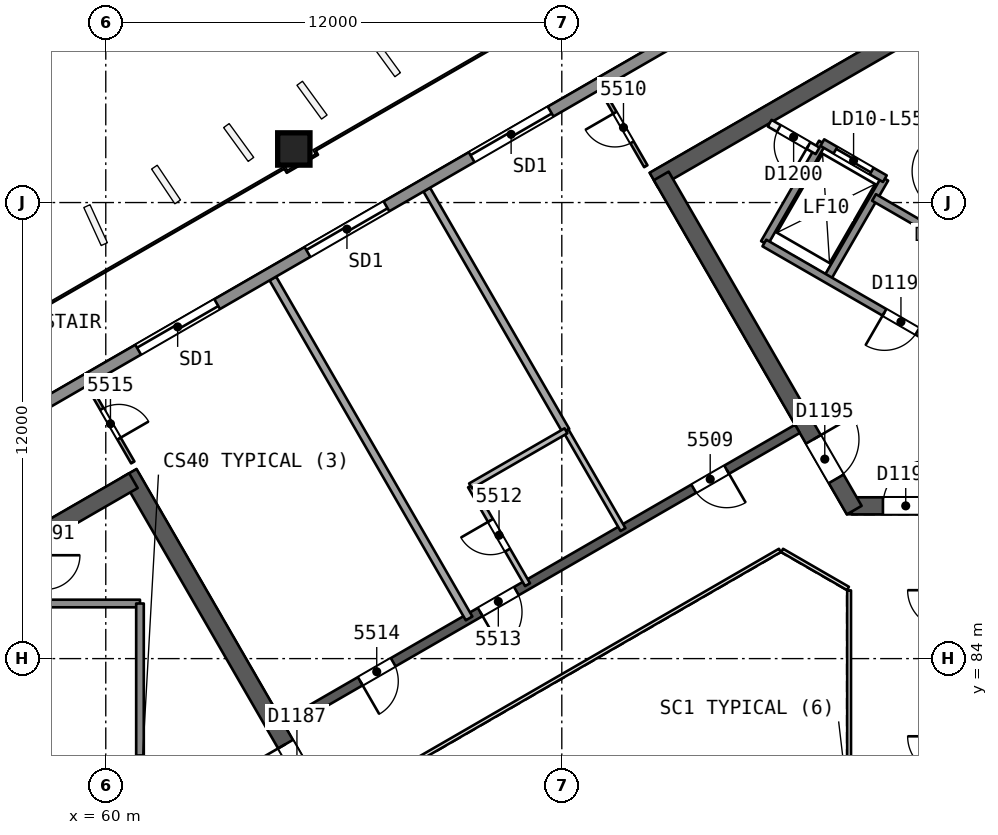
"""IFC4 building model, lengths in metres.
Left out: names, types, materials, properties, quantities, classifications, styles, units other than length and angle.
Written with IfcOpenShell. Run it as: python <this file> out.ifc"""

import sys

from ifc_helpers import new_model, si_unit, direction, frame, frame_2d, origin, origin_2d, place, context, subcontext, project, spatial, rectangle, extrude, element, fill, save


model = new_model("IFC4")
c1 = context("Model", 3, precision=1e-05, world=origin(), true_north=direction((0.0, 1.0)))
c2 = subcontext(c1, "Body", "Model", "MODEL_VIEW")
j1 = project(units=[si_unit("LENGTHUNIT", "METRE"), si_unit("PLANEANGLEUNIT", "RADIAN")], contexts=[c1])
p1 = place(None, origin())
s1 = spatial("IfcSite", under=j1, at=p1, CompositionType="ELEMENT")
p2 = place(p1, origin())
s2 = spatial("IfcBuilding", under=s1, at=p2, CompositionType="ELEMENT")
p3 = place(p2, frame((0.0, 0.0, 224.3)))
s3 = spatial("IfcBuildingStorey", under=s2, at=p3, CompositionType="ELEMENT", Elevation=224.3)
p4 = place(p3, frame((65.74, 80.0, 0.0), z_axis=(0.0, 0.0, 1.0), x_axis=(-0.499991857942, 0.866030104553, 0.0)))
e1 = element("IfcWall", 1, at=p4, inside=s3, PredefinedType="SHEAR", context=c2, shape_type="SweptSolid", body=[
    extrude(rectangle(XDim=10.25, YDim=0.45, at=frame_2d((5.125, 0.0))), origin(), (0.0, 0.0, 1.0), 3.7),
])
p5 = place(p4, frame((0.82, 0.0, 0.0)))
e2 = element("IfcOpeningElement", 2, at=p5, cuts=e1, PredefinedType="OPENING", context=c2, shape_type="SweptSolid", body=[
    extrude(rectangle(XDim=1.2, YDim=2.1, at=frame_2d((0.6, 1.05))), frame((0.0, 0.235, 0.0), z_axis=(0.0, -1.0, 0.0), x_axis=(1.0, 0.0, 0.0)), (0.0, 0.0, 1.0), 0.471),
])
p6 = place(p3, frame((60.728, 88.682, 0.0), z_axis=(0.0, 0.0, 1.0), x_axis=(-0.866021613849, -0.500006564303, 0.0)))
e3 = element("IfcWall", 3, at=p6, inside=s3, PredefinedType="SHEAR", context=c2, shape_type="SweptSolid", body=[
    extrude(rectangle(XDim=14.108, YDim=0.45, at=frame_2d((7.054, 0.0))), origin(), (0.0, 0.0, 1.0), 3.7),
])
p7 = place(p3, frame((79.63, 88.019, 0.0), z_axis=(0.0, 0.0, 1.0), x_axis=(1.0, 0.0, 0.0)))
e4 = element("IfcWall", 4, at=p7, inside=s3, PredefinedType="SHEAR", context=c2, shape_type="SweptSolid", body=[
    extrude(rectangle(XDim=10.25, YDim=0.45, at=frame_2d((5.125, 0.0))), origin(), (0.0, 0.0, 1.0), 3.7),
])
p8 = place(p7, frame((0.82, 0.0, 0.0)))
e5 = element("IfcOpeningElement", 5, at=p8, cuts=e4, PredefinedType="OPENING", context=c2, shape_type="SweptSolid", body=[
    extrude(rectangle(XDim=1.2, YDim=2.1, at=frame_2d((0.6, 1.05))), frame((0.0, 0.235, 0.0), z_axis=(0.0, -1.0, 0.0), x_axis=(1.0, 0.0, 0.0)), (0.0, 0.0, 1.0), 0.471),
])
p9 = place(p3, frame((86.723, 103.69, 0.0), z_axis=(0.0, 0.0, 1.0), x_axis=(-0.866022713978, -0.500004658852, 0.0)))
e6 = element("IfcWall", 6, at=p9, inside=s3, PredefinedType="SHEAR", context=c2, shape_type="SweptSolid", body=[
    extrude(rectangle(XDim=14.203, YDim=0.45, at=frame_2d((7.102, 0.0))), origin(), (0.0, 0.0, 1.0), 3.7),
])
p10 = place(p3, frame((74.617, 96.701, 0.0), z_axis=(0.0, 0.0, 1.0), x_axis=(0.499994385119, -0.866028645513, 0.0)))
e7 = element("IfcWall", 7, at=p10, inside=s3, PredefinedType="SHEAR", context=c2, shape_type="SweptSolid", body=[
    extrude(rectangle(XDim=10.155, YDim=0.45, at=frame_2d((5.077, 0.0))), origin(), (0.0, 0.0, 1.0), 3.7),
])
p11 = place(p10, frame((8.005, 0.0, 0.0)))
e8 = element("IfcOpeningElement", 8, at=p11, cuts=e7, PredefinedType="OPENING", context=c2, shape_type="SweptSolid", body=[
    extrude(rectangle(XDim=1.2, YDim=2.1, at=frame_2d((0.6, 1.05))), frame((0.0, 0.235, 0.0), z_axis=(0.0, -1.0, 0.0), x_axis=(1.0, 0.0, 0.0)), (0.0, 0.0, 1.0), 0.471),
])
p12 = place(p3, frame((78.2, 90.046, 0.0), z_axis=(0.0, 0.0, 1.0), x_axis=(-0.866026492143, -0.499998114903, 0.0)))
e9 = element("IfcWall", 9, at=p12, inside=s3, PredefinedType="SHEAR", context=c2, shape_type="SweptSolid", body=[
    extrude(rectangle(XDim=15.588, YDim=0.25, at=frame_2d((7.794, 0.0))), origin(), (0.0, 0.0, 1.0), 3.3),
])
p13 = place(p12, frame((2.15, 0.0, 0.0)))
e10 = element("IfcOpeningElement", 10, at=p13, cuts=e9, PredefinedType="OPENING", context=c2, shape_type="SweptSolid", body=[
    extrude(rectangle(XDim=1.0, YDim=2.1, at=frame_2d((0.5, 1.05))), frame((0.0, 0.135, 0.0), z_axis=(0.0, -1.0, 0.0), x_axis=(1.0, 0.0, 0.0)), (0.0, 0.0, 1.0), 0.271),
])
p14 = place(p12, frame((8.538, 0.0, 0.0)))
e11 = element("IfcOpeningElement", 11, at=p14, cuts=e9, PredefinedType="OPENING", context=c2, shape_type="SweptSolid", body=[
    extrude(rectangle(XDim=1.1, YDim=2.1, at=frame_2d((0.55, 1.05))), frame((0.0, 0.135, 0.0), z_axis=(0.0, -1.0, 0.0), x_axis=(1.0, 0.0, 0.0)), (0.0, 0.0, 1.0), 0.271),
])
p15 = place(p12, frame((12.282, 0.0, 0.0)))
e12 = element("IfcOpeningElement", 12, at=p15, cuts=e9, PredefinedType="OPENING", context=c2, shape_type="SweptSolid", body=[
    extrude(rectangle(XDim=1.0, YDim=2.1, at=frame_2d((0.5, 1.05))), frame((0.0, 0.135, 0.0), z_axis=(0.0, -1.0, 0.0), x_axis=(1.0, 0.0, 0.0)), (0.0, 0.0, 1.0), 0.271),
])
p16 = place(p3, frame((64.936, 97.431, 0.0), z_axis=(0.010093620709, -0.017482414954, 0.999796221231), x_axis=(0.86601685016, 0.500014815019, 2.20911e-07)))
e13 = element("IfcColumn", 13, at=p16, inside=s3, PredefinedType="COLUMN", context=c2, shape_type="SweptSolid", body=[
    extrude(rectangle(XDim=0.85, YDim=0.85, at=origin_2d()), origin(), (0.0, 0.0, 1.0), 3.701),
])
p17 = place(p3, frame((74.21, 96.956, 0.0), z_axis=(0.0, 0.0, 1.0), x_axis=(-0.499950341091, 0.86605407247, 0.0)))
e14 = element("IfcWall", 14, at=p17, inside=s3, PredefinedType="PARTITIONING", context=c2, shape_type="SweptSolid", body=[
    extrude(rectangle(XDim=2.349, YDim=0.1, at=frame_2d((1.175, 0.0))), origin(), (0.0, 0.0, 1.0), 3.3),
])
p18 = place(p17, frame((0.725, 0.0, 0.0)))
e15 = element("IfcOpeningElement", 15, at=p18, cuts=e14, PredefinedType="OPENING", context=c2, shape_type="SweptSolid", body=[
    extrude(rectangle(XDim=0.9, YDim=2.1, at=frame_2d((0.45, 1.05))), frame((0.0, 0.061, 0.0), z_axis=(0.0, -1.0, 0.0), x_axis=(1.0, 0.0, 0.0)), (0.0, 0.0, 1.0), 0.121),
])
p19 = place(p3, frame((68.446, 96.34, 0.0), z_axis=(0.0, 0.0, 1.0), x_axis=(0.500019482754, -0.866014155119, 0.0)))
e16 = element("IfcWall", 16, at=p19, inside=s3, PredefinedType="PARTITIONING", context=c2, shape_type="SweptSolid", body=[
    extrude(rectangle(XDim=7.328, YDim=0.2, at=frame_2d((3.664, 0.0))), origin(), (0.0, 0.0, 1.0), 3.3),
])
p20 = place(p3, frame((72.11, 89.994, 0.0), z_axis=(0.0, 0.0, 1.0), x_axis=(0.499990139034, -0.866031096941, 0.0)))
e17 = element("IfcWall", 17, at=p20, inside=s3, PredefinedType="PARTITIONING", context=c2, shape_type="SweptSolid", body=[
    extrude(rectangle(XDim=3.0, YDim=0.15, at=frame_2d((1.5, 0.0))), origin(), (0.0, 0.0, 1.0), 3.3),
])
p21 = place(p3, frame((71.099, 85.946, 0.0), z_axis=(0.0, 0.0, 1.0), x_axis=(-0.499990139034, 0.866031096941, 0.0)))
e18 = element("IfcWall", 18, at=p21, inside=s3, PredefinedType="PARTITIONING", context=c2, shape_type="SweptSolid", body=[
    extrude(rectangle(XDim=3.0, YDim=0.15, at=frame_2d((1.5, 0.0))), origin(), (0.0, 0.0, 1.0), 3.3),
])
p22 = place(p21, frame((1.05, 0.0, 0.0)))
e19 = element("IfcOpeningElement", 19, at=p22, cuts=e18, PredefinedType="OPENING", context=c2, shape_type="SweptSolid", body=[
    extrude(rectangle(XDim=0.9, YDim=2.1, at=frame_2d((0.45, 1.05))), frame((0.0, 0.085, 0.0), z_axis=(0.0, -1.0, 0.0), x_axis=(1.0, 0.0, 0.0)), (0.0, 0.0, 1.0), 0.171),
])
p23 = place(p3, frame((69.599, 88.544, 0.0), z_axis=(0.0, 0.0, 1.0), x_axis=(0.866032775405, 0.499987231761, 0.0)))
e20 = element("IfcWall", 20, at=p23, inside=s3, PredefinedType="PARTITIONING", context=c2, shape_type="SweptSolid", body=[
    extrude(rectangle(XDim=2.9, YDim=0.15, at=frame_2d((1.45, 0.0))), origin(), (0.0, 0.0, 1.0), 3.3),
])
p24 = place(p3, frame((64.396, 94.002, 0.0), z_axis=(0.0, 0.0, 1.0), x_axis=(0.50001095942, -0.866019076268, 0.0)))
e21 = element("IfcWall", 21, at=p24, inside=s3, PredefinedType="PARTITIONING", context=c2, shape_type="SweptSolid", body=[
    extrude(rectangle(XDim=10.328, YDim=0.2, at=frame_2d((5.164, 0.0))), origin(), (0.0, 0.0, 1.0), 3.3),
])
p25 = place(p3, frame((59.536, 91.196, 0.0), z_axis=(0.0, 0.0, 1.0), x_axis=(0.499950341091, -0.86605407247, 0.0)))
e22 = element("IfcWall", 22, at=p25, inside=s3, PredefinedType="PARTITIONING", context=c2, shape_type="SweptSolid", body=[
    extrude(rectangle(XDim=2.349, YDim=0.1, at=frame_2d((1.175, 0.0))), origin(), (0.0, 0.0, 1.0), 3.3),
])
p26 = place(p25, frame((0.725, 0.0, 0.0)))
e23 = element("IfcOpeningElement", 23, at=p26, cuts=e22, PredefinedType="OPENING", context=c2, shape_type="SweptSolid", body=[
    extrude(rectangle(XDim=0.9, YDim=2.1, at=frame_2d((0.45, 1.05))), frame((0.0, 0.061, 0.0), z_axis=(0.0, -1.0, 0.0), x_axis=(1.0, 0.0, 0.0)), (0.0, 0.0, 1.0), 0.121),
])
p27 = place(p3, frame((44.324, 82.585, 0.0), z_axis=(0.0, 0.0, 1.0), x_axis=(0.86602584856, 0.499999229625, 0.0)))
e24 = element("IfcWall", 24, at=p27, inside=s3, PredefinedType="SOLIDWALL", context=c2, shape_type="SweptSolid", body=[
    extrude(rectangle(XDim=50.547, YDim=0.3, at=frame_2d((25.274, 0.0))), origin(), (0.0, 0.0, 1.0), 3.3),
])
p28 = place(p27, frame((24.23, 0.0, 0.0)))
e25 = element("IfcOpeningElement", 25, at=p28, cuts=e24, PredefinedType="OPENING", context=c2, shape_type="SweptSolid", body=[
    extrude(rectangle(XDim=2.4, YDim=2.4, at=frame_2d((1.2, 1.2))), frame((0.0, 0.161, 0.0), z_axis=(0.0, -1.0, 0.0), x_axis=(1.0, 0.0, 0.0)), (0.0, 0.0, 1.0), 0.321),
])
p29 = place(p27, frame((29.218, 0.0, 0.0)))
e26 = element("IfcOpeningElement", 26, at=p29, cuts=e24, PredefinedType="OPENING", context=c2, shape_type="SweptSolid", body=[
    extrude(rectangle(XDim=2.4, YDim=2.4, at=frame_2d((1.2, 1.2))), frame((0.0, 0.161, 0.0), z_axis=(0.0, -1.0, 0.0), x_axis=(1.0, 0.0, 0.0)), (0.0, 0.0, 1.0), 0.321),
])
p30 = place(p27, frame((39.328, 0.0, 0.0)))
e27 = element("IfcOpeningElement", 27, at=p30, cuts=e24, PredefinedType="OPENING", context=c2, shape_type="SweptSolid", body=[
    extrude(rectangle(XDim=2.4, YDim=2.4, at=frame_2d((1.2, 1.2))), frame((0.0, 0.161, 0.0), z_axis=(0.0, -1.0, 0.0), x_axis=(1.0, 0.0, 0.0)), (0.0, 0.0, 1.0), 0.321),
])
p31 = place(p27, frame((19.085, 0.0, 0.0)))
e28 = element("IfcOpeningElement", 28, at=p31, cuts=e24, PredefinedType="OPENING", context=c2, shape_type="SweptSolid", body=[
    extrude(rectangle(XDim=2.4, YDim=2.4, at=frame_2d((1.2, 1.2))), frame((0.0, 0.161, 0.0), z_axis=(0.0, -1.0, 0.0), x_axis=(1.0, 0.0, 0.0)), (0.0, 0.0, 1.0), 0.321),
])
p32 = place(p27, frame((8.771, 0.0, 0.0)))
e29 = element("IfcOpeningElement", 29, at=p32, cuts=e24, PredefinedType="OPENING", context=c2, shape_type="SweptSolid", body=[
    extrude(rectangle(XDim=2.4, YDim=2.4, at=frame_2d((1.2, 1.2))), frame((0.0, 0.161, 0.0), z_axis=(0.0, -1.0, 0.0), x_axis=(1.0, 0.0, 0.0)), (0.0, 0.0, 1.0), 0.321),
])
p33 = place(p3, frame((60.9, 85.45, 0.0), z_axis=(0.0, 0.0, 1.0), x_axis=(-1.0, 0.0, 0.0)))
e30 = element("IfcWall", 30, at=p33, inside=s3, PredefinedType="SOLIDWALL", context=c2, shape_type="SweptSolid", body=[
    extrude(rectangle(XDim=2.48, YDim=0.2, at=frame_2d((1.24, 0.0))), origin(), (0.0, 0.0, 1.0), 3.3),
])
p34 = place(p3, frame((60.9, 85.45, 0.0), z_axis=(0.0, 0.0, 1.0), x_axis=(0.0, -1.0, 0.0)))
e31 = element("IfcWall", 31, at=p34, inside=s3, PredefinedType="SOLIDWALL", context=c2, shape_type="SweptSolid", body=[
    extrude(rectangle(XDim=10.9, YDim=0.2, at=frame_2d((5.45, 0.0))), origin(), (0.0, 0.0, 1.0), 3.3),
])
p35 = place(p34, frame((4.0, 0.0, 0.0)))
e32 = element("IfcOpeningElement", 32, at=p35, cuts=e31, PredefinedType="OPENING", context=c2, shape_type="SweptSolid", body=[
    extrude(rectangle(XDim=1.0, YDim=2.1, at=frame_2d((0.5, 1.05))), frame((0.0, 0.11, 0.0), z_axis=(0.0, -1.0, 0.0), x_axis=(1.0, 0.0, 0.0)), (0.0, 0.0, 1.0), 0.221),
])
for number, where, z_axis, x_axis in (
    (33, (78.976, 93.986, 0.0), (0.0, 0.0, 1.0), (0.5, 0.866, 0.0)),
    (34, (77.33, 94.936, 0.0), (0.0, 0.0, 1.0), (0.5, 0.866, 0.0)),
):
    element("IfcWall", number, at=place(p3, frame(where, z_axis=z_axis, x_axis=x_axis)), inside=s3, PredefinedType="SOLIDWALL", context=c2, shape_type="SweptSolid", body=[
        extrude(rectangle(XDim=3.05, YDim=0.2, at=frame_2d((1.525, 0.0))), origin(), (0.0, 0.0, 1.0), 3.3),
    ])
p36 = place(p3, frame((86.77, 89.486, 0.0), z_axis=(0.0, 0.0, 1.0), x_axis=(-0.86601811187, 0.500012629753, 0.0)))
e35 = element("IfcWall", 35, at=p36, inside=s3, PredefinedType="SOLIDWALL", context=c2, shape_type="SweptSolid", body=[
    extrude(rectangle(XDim=10.9, YDim=0.2, at=frame_2d((5.45, 0.0))), origin(), (0.0, 0.0, 1.0), 3.3),
])
p37 = place(p36, frame((0.625, 0.0, 0.0)))
e36 = element("IfcOpeningElement", 36, at=p37, cuts=e35, PredefinedType="OPENING", context=c2, shape_type="SweptSolid", body=[
    extrude(rectangle(XDim=1.0, YDim=2.1, at=frame_2d((0.5, 1.05))), frame((0.0, 0.11, 0.0), z_axis=(0.0, -1.0, 0.0), x_axis=(1.0, 0.0, 0.0)), (0.0, 0.0, 1.0), 0.221),
])
p38 = place(p36, frame((2.875, 0.0, 0.0)))
e37 = element("IfcOpeningElement", 37, at=p38, cuts=e35, PredefinedType="OPENING", context=c2, shape_type="SweptSolid", body=[
    extrude(rectangle(XDim=1.0, YDim=2.1, at=frame_2d((0.5, 1.05))), frame((0.0, 0.11, 0.0), z_axis=(0.0, -1.0, 0.0), x_axis=(1.0, 0.0, 0.0)), (0.0, 0.0, 1.0), 0.221),
])
p39 = place(p36, frame((6.25, 0.0, 0.0)))
e38 = element("IfcOpeningElement", 38, at=p39, cuts=e35, PredefinedType="OPENING", context=c2, shape_type="SweptSolid", body=[
    extrude(rectangle(XDim=1.0, YDim=2.1, at=frame_2d((0.5, 1.05))), frame((0.0, 0.11, 0.0), z_axis=(0.0, -1.0, 0.0), x_axis=(1.0, 0.0, 0.0)), (0.0, 0.0, 1.0), 0.221),
])
p40 = place(p3, frame((89.43, 90.814, 0.0), z_axis=(0.0, 0.0, 1.0), x_axis=(-0.866018983788, 0.500011119594, 0.0)))
e39 = element("IfcWall", 39, at=p40, inside=s3, PredefinedType="SOLIDWALL", context=c2, shape_type="SweptSolid", body=[
    extrude(rectangle(XDim=10.64, YDim=0.2, at=frame_2d((5.32, 0.0))), origin(), (0.0, 0.0, 1.0), 3.3),
])
p41 = place(p40, frame((0.37, 0.0, 0.0)))
e40 = element("IfcOpeningElement", 40, at=p41, cuts=e39, PredefinedType="OPENING", context=c2, shape_type="SweptSolid", body=[
    extrude(rectangle(XDim=0.9, YDim=2.1, at=frame_2d((0.45, 1.05))), frame((0.0, 0.11, 0.0), z_axis=(0.0, -1.0, 0.0), x_axis=(1.0, 0.0, 0.0)), (0.0, 0.0, 1.0), 0.221),
])
p42 = place(p3, frame((78.73, 97.361, 0.0), z_axis=(0.0, 0.0, 1.0), x_axis=(-0.866045896294, 0.499964504253, 0.0)))
e41 = element("IfcWall", 41, at=p42, inside=s3, PredefinedType="PARTITIONING", context=c2, shape_type="SweptSolid", body=[
    extrude(rectangle(XDim=1.455, YDim=0.2, at=frame_2d((0.728, 0.0))), origin(), (0.0, 0.0, 1.0), 3.3),
])
p43 = place(p42, frame((0.278, 0.0, 0.0)))
e42 = element("IfcOpeningElement", 42, at=p43, cuts=e41, PredefinedType="OPENING", context=c2, shape_type="SweptSolid", body=[
    extrude(rectangle(XDim=0.9, YDim=2.1, at=frame_2d((0.45, 1.05))), frame((0.0, 0.11, 0.0), z_axis=(0.0, -1.0, 0.0), x_axis=(1.0, 0.0, 0.0)), (0.0, 0.0, 1.0), 0.221),
])
p44 = place(p3, frame((80.5, 96.627, 0.0), z_axis=(0.0, 0.0, 1.0), x_axis=(-0.86601224135, 0.500022797313, 0.0)))
e43 = element("IfcWall", 43, at=p44, inside=s3, PredefinedType="SOLIDWALL", context=c2, shape_type="SweptSolid", body=[
    extrude(rectangle(XDim=1.9, YDim=0.2, at=frame_2d((0.95, 0.0))), origin(), (0.0, 0.0, 1.0), 3.3),
])
p45 = place(p44, frame((0.4, 0.0, 0.0)))
e44 = element("IfcOpeningElement", 44, at=p45, cuts=e43, PredefinedType="OPENING", context=c2, shape_type="SweptSolid", body=[
    extrude(rectangle(XDim=1.1, YDim=2.1, at=frame_2d((0.55, 1.05))), frame((0.0, 0.11, 0.0), z_axis=(0.0, -1.0, 0.0), x_axis=(1.0, 0.0, 0.0)), (0.0, 0.0, 1.0), 0.221),
])
p46 = place(p3, frame((79.56, 74.206, 0.0), z_axis=(0.0, 0.0, 1.0), x_axis=(0.0, 1.0, 0.0)))
e45 = element("IfcWall", 45, at=p46, inside=s3, PredefinedType="PARTITIONING", context=c2, shape_type="SweptSolid", body=[
    extrude(rectangle(XDim=11.588, YDim=0.1, at=frame_2d((5.794, 0.0))), origin(), (0.0, 0.0, 1.0), 3.3),
])
p47 = place(p3, frame((79.53, 85.846, 0.0), z_axis=(0.0, 0.0, 1.0), x_axis=(-0.866041268327, 0.499972520799, 0.0)))
e46 = element("IfcWall", 46, at=p47, inside=s3, PredefinedType="PARTITIONING", context=c2, shape_type="SweptSolid", body=[
    extrude(rectangle(XDim=2.0, YDim=0.1, at=frame_2d((1.0, 0.0))), origin(), (0.0, 0.0, 1.0), 3.3),
])
p48 = place(p3, frame((77.738, 86.846, 0.0), z_axis=(0.0, 0.0, 1.0), x_axis=(-0.866026658274, -0.499997827154, 0.0)))
e47 = element("IfcWall", 47, at=p48, inside=s3, PredefinedType="PARTITIONING", context=c2, shape_type="SweptSolid", body=[
    extrude(rectangle(XDim=11.588, YDim=0.1, at=frame_2d((5.794, 0.0))), origin(), (0.0, 0.0, 1.0), 3.3),
])
p49 = place(p13, origin())
e48 = element("IfcDoor", 48, at=p49, inside=s3, OperationType="SINGLE_SWING_LEFT", PredefinedType="NOTDEFINED", context=c2, shape_type="SweptSolid", body=[
    extrude(rectangle(XDim=1.0, YDim=2.1, at=frame_2d((0.5, 1.05))), frame((0.0, 0.025, 0.0), z_axis=(0.0, -1.0, 0.0), x_axis=(1.0, 0.0, 0.0)), (0.0, 0.0, 1.0), 0.05),
])
fill(e10, e48)
p50 = place(p18, origin())
e49 = element("IfcDoor", 49, at=p50, inside=s3, OperationType="SINGLE_SWING_RIGHT", PredefinedType="NOTDEFINED", context=c2, shape_type="SweptSolid", body=[
    extrude(rectangle(XDim=0.9, YDim=2.1, at=frame_2d((0.45, 1.05))), frame((0.0, 0.025, 0.0), z_axis=(0.0, -1.0, 0.0), x_axis=(1.0, 0.0, 0.0)), (0.0, 0.0, 1.0), 0.05),
])
fill(e15, e49)
p51 = place(p22, origin())
e50 = element("IfcDoor", 50, at=p51, inside=s3, OperationType="SINGLE_SWING_RIGHT", PredefinedType="NOTDEFINED", context=c2, shape_type="SweptSolid", body=[
    extrude(rectangle(XDim=0.9, YDim=2.1, at=frame_2d((0.45, 1.05))), frame((0.0, 0.025, 0.0), z_axis=(0.0, -1.0, 0.0), x_axis=(1.0, 0.0, 0.0)), (0.0, 0.0, 1.0), 0.05),
])
fill(e19, e50)
p52 = place(p14, origin())
e51 = element("IfcDoor", 51, at=p52, inside=s3, OperationType="SINGLE_SWING_RIGHT", PredefinedType="NOTDEFINED", context=c2, shape_type="SweptSolid", body=[
    extrude(rectangle(XDim=1.1, YDim=2.1, at=frame_2d((0.55, 1.05))), frame((0.0, 0.025, 0.0), z_axis=(0.0, -1.0, 0.0), x_axis=(1.0, 0.0, 0.0)), (0.0, 0.0, 1.0), 0.05),
])
fill(e11, e51)
p53 = place(p15, origin())
e52 = element("IfcDoor", 52, at=p53, inside=s3, OperationType="SINGLE_SWING_RIGHT", PredefinedType="NOTDEFINED", context=c2, shape_type="SweptSolid", body=[
    extrude(rectangle(XDim=1.0, YDim=2.1, at=frame_2d((0.5, 1.05))), frame((0.0, 0.025, 0.0), z_axis=(0.0, -1.0, 0.0), x_axis=(1.0, 0.0, 0.0)), (0.0, 0.0, 1.0), 0.05),
])
fill(e12, e52)
p54 = place(p26, origin())
e53 = element("IfcDoor", 53, at=p54, inside=s3, OperationType="SINGLE_SWING_RIGHT", PredefinedType="NOTDEFINED", context=c2, shape_type="SweptSolid", body=[
    extrude(rectangle(XDim=0.9, YDim=2.1, at=frame_2d((0.45, 1.05))), frame((0.0, 0.025, 0.0), z_axis=(0.0, -1.0, 0.0), x_axis=(1.0, 0.0, 0.0)), (0.0, 0.0, 1.0), 0.05),
])
fill(e23, e53)
p55 = place(p28, origin())
e54 = element("IfcDoor", 54, at=p55, inside=s3, OperationType="SLIDING_TO_LEFT", PredefinedType="NOTDEFINED", context=c2, shape_type="SweptSolid", body=[
    extrude(rectangle(XDim=2.4, YDim=2.4, at=frame_2d((1.2, 1.2))), frame((0.0, 0.025, 0.0), z_axis=(0.0, -1.0, 0.0), x_axis=(1.0, 0.0, 0.0)), (0.0, 0.0, 1.0), 0.05),
])
fill(e25, e54)
p56 = place(p29, origin())
e55 = element("IfcDoor", 55, at=p56, inside=s3, OperationType="SLIDING_TO_RIGHT", PredefinedType="NOTDEFINED", context=c2, shape_type="SweptSolid", body=[
    extrude(rectangle(XDim=2.4, YDim=2.4, at=frame_2d((1.2, 1.2))), frame((0.0, 0.025, 0.0), z_axis=(0.0, -1.0, 0.0), x_axis=(1.0, 0.0, 0.0)), (0.0, 0.0, 1.0), 0.05),
])
fill(e26, e55)
p57 = place(p31, origin())
e56 = element("IfcDoor", 56, at=p57, inside=s3, OperationType="SLIDING_TO_RIGHT", PredefinedType="NOTDEFINED", context=c2, shape_type="SweptSolid", body=[
    extrude(rectangle(XDim=2.4, YDim=2.4, at=frame_2d((1.2, 1.2))), frame((0.0, 0.025, 0.0), z_axis=(0.0, -1.0, 0.0), x_axis=(1.0, 0.0, 0.0)), (0.0, 0.0, 1.0), 0.05),
])
fill(e28, e56)
p58 = place(p5, origin())
e57 = element("IfcDoor", 57, at=p58, inside=s3, OperationType="SINGLE_SWING_RIGHT", PredefinedType="NOTDEFINED", context=c2, shape_type="SweptSolid", body=[
    extrude(rectangle(XDim=1.2, YDim=2.1, at=frame_2d((0.6, 1.05))), frame((0.0, 0.025, 0.0), z_axis=(0.0, -1.0, 0.0), x_axis=(1.0, 0.0, 0.0)), (0.0, 0.0, 1.0), 0.05),
])
fill(e2, e57)
p59 = place(p8, origin())
e58 = element("IfcDoor", 58, at=p59, inside=s3, OperationType="SINGLE_SWING_RIGHT", PredefinedType="NOTDEFINED", context=c2, shape_type="SweptSolid", body=[
    extrude(rectangle(XDim=1.2, YDim=2.1, at=frame_2d((0.6, 1.05))), frame((0.0, 0.025, 0.0), z_axis=(0.0, -1.0, 0.0), x_axis=(1.0, 0.0, 0.0)), (0.0, 0.0, 1.0), 0.05),
])
fill(e5, e58)
p60 = place(p11, origin())
e59 = element("IfcDoor", 59, at=p60, inside=s3, OperationType="SINGLE_SWING_LEFT", PredefinedType="NOTDEFINED", context=c2, shape_type="SweptSolid", body=[
    extrude(rectangle(XDim=1.2, YDim=2.1, at=frame_2d((0.6, 1.05))), frame((0.0, 0.025, 0.0), z_axis=(0.0, -1.0, 0.0), x_axis=(1.0, 0.0, 0.0)), (0.0, 0.0, 1.0), 0.05),
])
fill(e8, e59)
p61 = place(p45, origin())
e60 = element("IfcDoor", 60, at=p61, inside=s3, OperationType="SLIDING_TO_RIGHT", PredefinedType="NOTDEFINED", context=c2, shape_type="SweptSolid", body=[
    extrude(rectangle(XDim=1.1, YDim=2.1, at=frame_2d((0.55, 1.05))), frame((0.0, 0.025, 0.0), z_axis=(0.0, -1.0, 0.0), x_axis=(1.0, 0.0, 0.0)), (0.0, 0.0, 1.0), 0.05),
])
fill(e44, e60)
p62 = place(p39, origin())
e61 = element("IfcDoor", 61, at=p62, inside=s3, OperationType="SINGLE_SWING_RIGHT", PredefinedType="NOTDEFINED", context=c2, shape_type="SweptSolid", body=[
    extrude(rectangle(XDim=1.0, YDim=2.1, at=frame_2d((0.5, 1.05))), frame((0.0, 0.025, 0.0), z_axis=(0.0, -1.0, 0.0), x_axis=(1.0, 0.0, 0.0)), (0.0, 0.0, 1.0), 0.05),
])
fill(e38, e61)
p63 = place(p43, origin())
e62 = element("IfcDoor", 62, at=p63, inside=s3, OperationType="SINGLE_SWING_LEFT", PredefinedType="NOTDEFINED", context=c2, shape_type="SweptSolid", body=[
    extrude(rectangle(XDim=0.9, YDim=2.1, at=frame_2d((0.45, 1.05))), frame((0.0, 0.025, 0.0), z_axis=(0.0, -1.0, 0.0), x_axis=(1.0, 0.0, 0.0)), (0.0, 0.0, 1.0), 0.05),
])
fill(e42, e62)
save(model, sys.argv[1])
